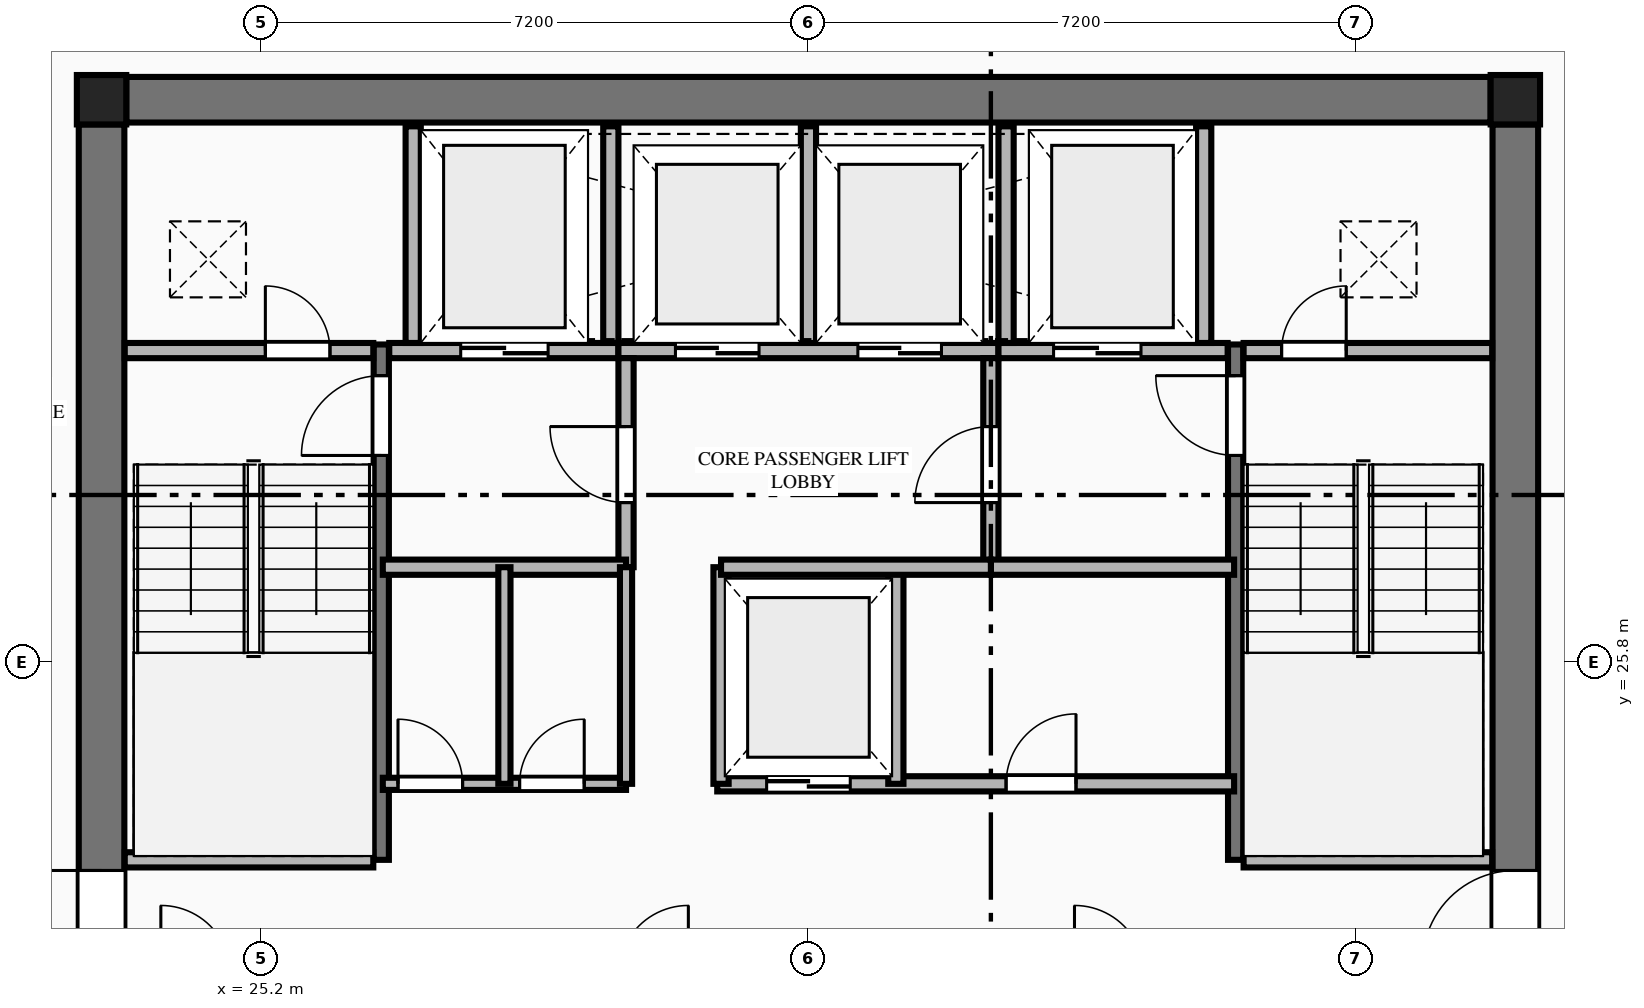
"""IFC4 building model, lengths in metres.
Left out: names, types, materials, properties, quantities, classifications, styles, units other than length and angle.
Written with IfcOpenShell. Run it as: python <this file> out.ifc"""

import sys

from ifc_helpers import new_model, si_unit, direction, frame, frame_2d, origin, origin_2d, place, context, subcontext, project, spatial, rectangle, extrude, element, fill, save


model = new_model("IFC4")
c1 = context("Model", 3, precision=1e-05, world=origin(), true_north=direction((0.0, 1.0)))
c2 = subcontext(c1, "Body", "Model", "MODEL_VIEW")
j1 = project(units=[si_unit("LENGTHUNIT", "METRE"), si_unit("PLANEANGLEUNIT", "RADIAN")], contexts=[c1])
p1 = place(None, origin())
s1 = spatial("IfcSite", under=j1, at=p1, CompositionType="ELEMENT")
p2 = place(p1, origin())
s2 = spatial("IfcBuilding", under=s1, at=p2, CompositionType="ELEMENT")
p3 = place(p2, frame((0.0, 0.0, 207.4)))
s3 = spatial("IfcBuildingStorey", under=s2, at=p3, CompositionType="ELEMENT", Elevation=207.4)
for number, where, z_axis, x_axis in (
    (1, (41.7, 33.2, 0.0), (0.0, 0.0, 1.0), (1.0, 0.0, 0.0)),
    (2, (23.1, 33.2, 0.0), (0.0, 0.0, 1.0), (1.0, 0.0, 0.0)),
):
    element("IfcColumn", number, at=place(p3, frame(where, z_axis=z_axis, x_axis=x_axis)), inside=s3, PredefinedType="COLUMN", context=c2, shape_type="SweptSolid", body=[
        extrude(rectangle(XDim=0.65, YDim=0.65, at=origin_2d()), origin(), (0.0, 0.0, 1.0), 3.55),
    ])
p4 = place(p3, frame((23.425, 33.2, 0.0), z_axis=(0.0, 0.0, 1.0), x_axis=(1.0, 0.0, 0.0)))
e3 = element("IfcWall", 3, at=p4, inside=s3, PredefinedType="SHEAR", context=c2, shape_type="SweptSolid", body=[
    extrude(rectangle(XDim=17.95, YDim=0.6, at=frame_2d((8.975, 0.0))), origin(), (0.0, 0.0, 1.0), 3.35),
])
p5 = place(p3, frame((23.1, 18.925, 0.0), z_axis=(0.0, 0.0, 1.0), x_axis=(0.0, 1.0, 0.0)))
e4 = element("IfcWall", 4, at=p5, inside=s3, PredefinedType="SHEAR", context=c2, shape_type="SweptSolid", body=[
    extrude(rectangle(XDim=13.95, YDim=0.6, at=frame_2d((6.975, 0.0))), origin(), (0.0, 0.0, 1.0), 3.35),
])
p6 = place(p5, frame((2.915, 0.0, 0.0)))
e5 = element("IfcOpeningElement", 5, at=p6, cuts=e4, PredefinedType="OPENING", context=c2, shape_type="SweptSolid", body=[
    extrude(rectangle(XDim=1.22, YDim=2.25, at=frame_2d((0.61, 1.125))), frame((0.0, 0.31, 0.0), z_axis=(0.0, -1.0, 0.0), x_axis=(1.0, 0.0, 0.0)), (0.0, 0.0, 1.0), 0.62),
])
p7 = place(p3, frame((41.7, 18.925, 0.0), z_axis=(0.0, 0.0, 1.0), x_axis=(0.0, 1.0, 0.0)))
e6 = element("IfcWall", 6, at=p7, inside=s3, PredefinedType="SHEAR", context=c2, shape_type="SweptSolid", body=[
    extrude(rectangle(XDim=13.95, YDim=0.6, at=frame_2d((6.975, 0.0))), origin(), (0.0, 0.0, 1.0), 3.35),
])
p8 = place(p7, frame((2.915, 0.0, 0.0)))
e7 = element("IfcOpeningElement", 7, at=p8, cuts=e6, PredefinedType="OPENING", context=c2, shape_type="SweptSolid", body=[
    extrude(rectangle(XDim=1.22, YDim=2.25, at=frame_2d((0.61, 1.125))), frame((0.0, 0.31, 0.0), z_axis=(0.0, -1.0, 0.0), x_axis=(1.0, 0.0, 0.0)), (0.0, 0.0, 1.0), 0.62),
])
p9 = place(p3, frame((26.78, 23.2, 0.0), z_axis=(0.0, 0.0, 1.0), x_axis=(0.0, 1.0, 0.0)))
e8 = element("IfcWall", 8, at=p9, inside=s3, PredefinedType="SHEAR", context=c2, shape_type="SweptSolid", body=[
    extrude(rectangle(XDim=6.78, YDim=0.2, at=frame_2d((3.39, 0.0))), origin(), (0.0, 0.0, 1.0), 3.55),
])
p10 = place(p9, frame((5.32, 0.0, 0.0)))
e9 = element("IfcOpeningElement", 9, at=p10, cuts=e8, PredefinedType="OPENING", context=c2, shape_type="SweptSolid", body=[
    extrude(rectangle(XDim=1.05, YDim=2.15, at=frame_2d((0.525, 1.075))), frame((0.0, 0.11, 0.0), z_axis=(0.0, -1.0, 0.0), x_axis=(1.0, 0.0, 0.0)), (0.0, 0.0, 1.0), 0.22),
])
p11 = place(p3, frame((23.405, 23.2, 0.0), z_axis=(0.0, 0.0, 1.0), x_axis=(1.0, 0.0, 0.0)))
e10 = element("IfcWall", 10, at=p11, inside=s3, PredefinedType="PLUMBINGWALL", context=c2, shape_type="SweptSolid", body=[
    extrude(rectangle(XDim=3.27, YDim=0.2, at=frame_2d((1.635, 0.0))), origin(), (0.0, 0.0, 1.0), 3.35),
])
p12 = place(p3, frame((38.02, 23.2, 0.0), z_axis=(0.0, 0.0, 1.0), x_axis=(0.0, 1.0, 0.0)))
e11 = element("IfcWall", 11, at=p12, inside=s3, PredefinedType="SHEAR", context=c2, shape_type="SweptSolid", body=[
    extrude(rectangle(XDim=6.78, YDim=0.2, at=frame_2d((3.39, 0.0))), origin(), (0.0, 0.0, 1.0), 3.55),
])
p13 = place(p12, frame((5.32, 0.0, 0.0)))
e12 = element("IfcOpeningElement", 12, at=p13, cuts=e11, PredefinedType="OPENING", context=c2, shape_type="SweptSolid", body=[
    extrude(rectangle(XDim=1.05, YDim=2.15, at=frame_2d((0.525, 1.075))), frame((0.0, 0.11, 0.0), z_axis=(0.0, -1.0, 0.0), x_axis=(1.0, 0.0, 0.0)), (0.0, 0.0, 1.0), 0.22),
])
p14 = place(p3, frame((38.125, 23.2, 0.0), z_axis=(0.0, 0.0, 1.0), x_axis=(1.0, 0.0, 0.0)))
e13 = element("IfcWall", 13, at=p14, inside=s3, PredefinedType="PLUMBINGWALL", context=c2, shape_type="SweptSolid", body=[
    extrude(rectangle(XDim=3.27, YDim=0.2, at=frame_2d((1.635, 0.0))), origin(), (0.0, 0.0, 1.0), 3.35),
])
p15 = place(p3, frame((23.405, 29.9, 0.0), z_axis=(0.0, 0.0, 1.0), x_axis=(1.0, 0.0, 0.0)))
e14 = element("IfcWall", 14, at=p15, inside=s3, PredefinedType="PLUMBINGWALL", context=c2, shape_type="SweptSolid", body=[
    extrude(rectangle(XDim=3.27, YDim=0.2, at=frame_2d((1.635, 0.0))), origin(), (0.0, 0.0, 1.0), 3.35),
])
p16 = place(p15, frame((1.85, 0.0, 0.0)))
e15 = element("IfcOpeningElement", 15, at=p16, cuts=e14, PredefinedType="OPENING", context=c2, shape_type="SweptSolid", body=[
    extrude(rectangle(XDim=0.85, YDim=2.05, at=frame_2d((0.425, 1.025))), frame((0.0, 0.11, 0.0), z_axis=(0.0, -1.0, 0.0), x_axis=(1.0, 0.0, 0.0)), (0.0, 0.0, 1.0), 0.22),
])
p17 = place(p3, frame((26.885, 29.9, 0.0), z_axis=(0.0, 0.0, 1.0), x_axis=(1.0, 0.0, 0.0)))
e16 = element("IfcWall", 16, at=p17, inside=s3, PredefinedType="PLUMBINGWALL", context=c2, shape_type="SweptSolid", body=[
    extrude(rectangle(XDim=3.015, YDim=0.2, at=frame_2d((1.507, 0.0))), origin(), (0.0, 0.0, 1.0), 3.35),
])
p18 = place(p17, frame((0.94, 0.0, 0.0)))
e17 = element("IfcOpeningElement", 17, at=p18, cuts=e16, PredefinedType="OPENING", context=c2, shape_type="SweptSolid", body=[
    extrude(rectangle(XDim=1.15, YDim=2.2, at=frame_2d((0.575, 1.1))), frame((0.0, 0.11, 0.0), z_axis=(0.0, -1.0, 0.0), x_axis=(1.0, 0.0, 0.0)), (0.0, 0.0, 1.0), 0.22),
])
p19 = place(p3, frame((29.9, 29.9, 0.0), z_axis=(0.0, 0.0, 1.0), x_axis=(1.0, 0.0, 0.0)))
e18 = element("IfcWall", 18, at=p19, inside=s3, PredefinedType="PLUMBINGWALL", context=c2, shape_type="SweptSolid", body=[
    extrude(rectangle(XDim=5.0, YDim=0.2, at=frame_2d((2.5, 0.0))), origin(), (0.0, 0.0, 1.0), 3.35),
])
p20 = place(p19, frame((0.75, 0.0, 0.0)))
e19 = element("IfcOpeningElement", 19, at=p20, cuts=e18, PredefinedType="OPENING", context=c2, shape_type="SweptSolid", body=[
    extrude(rectangle(XDim=1.1, YDim=2.2, at=frame_2d((0.55, 1.1))), frame((0.0, 0.11, 0.0), z_axis=(0.0, -1.0, 0.0), x_axis=(1.0, 0.0, 0.0)), (0.0, 0.0, 1.0), 0.22),
])
p21 = place(p19, frame((3.15, 0.0, 0.0)))
e20 = element("IfcOpeningElement", 20, at=p21, cuts=e18, PredefinedType="OPENING", context=c2, shape_type="SweptSolid", body=[
    extrude(rectangle(XDim=1.1, YDim=2.2, at=frame_2d((0.55, 1.1))), frame((0.0, 0.11, 0.0), z_axis=(0.0, -1.0, 0.0), x_axis=(1.0, 0.0, 0.0)), (0.0, 0.0, 1.0), 0.22),
])
p22 = place(p3, frame((34.9, 29.9, 0.0), z_axis=(0.0, 0.0, 1.0), x_axis=(1.0, 0.0, 0.0)))
e21 = element("IfcWall", 21, at=p22, inside=s3, PredefinedType="PLUMBINGWALL", context=c2, shape_type="SweptSolid", body=[
    extrude(rectangle(XDim=3.015, YDim=0.2, at=frame_2d((1.508, 0.0))), origin(), (0.0, 0.0, 1.0), 3.35),
])
p23 = place(p22, frame((0.725, 0.0, 0.0)))
e22 = element("IfcOpeningElement", 22, at=p23, cuts=e21, PredefinedType="OPENING", context=c2, shape_type="SweptSolid", body=[
    extrude(rectangle(XDim=1.15, YDim=2.2, at=frame_2d((0.575, 1.1))), frame((0.0, 0.11, 0.0), z_axis=(0.0, -1.0, 0.0), x_axis=(1.0, 0.0, 0.0)), (0.0, 0.0, 1.0), 0.22),
])
p24 = place(p3, frame((38.125, 29.9, 0.0), z_axis=(0.0, 0.0, 1.0), x_axis=(1.0, 0.0, 0.0)))
e23 = element("IfcWall", 23, at=p24, inside=s3, PredefinedType="PLUMBINGWALL", context=c2, shape_type="SweptSolid", body=[
    extrude(rectangle(XDim=3.27, YDim=0.2, at=frame_2d((1.635, 0.0))), origin(), (0.0, 0.0, 1.0), 3.35),
])
p25 = place(p24, frame((0.5, 0.0, 0.0)))
e24 = element("IfcOpeningElement", 24, at=p25, cuts=e23, PredefinedType="OPENING", context=c2, shape_type="SweptSolid", body=[
    extrude(rectangle(XDim=0.85, YDim=2.05, at=frame_2d((0.425, 1.025))), frame((0.0, 0.11, 0.0), z_axis=(0.0, -1.0, 0.0), x_axis=(1.0, 0.0, 0.0)), (0.0, 0.0, 1.0), 0.22),
])
for number, where, z_axis, x_axis in (
    (25, (27.2, 30.0, 0.0), (0.0, 0.0, 1.0), (0.0, 1.0, 0.0)),
    (26, (29.8, 30.0, 0.0), (0.0, 0.0, 1.0), (0.0, 1.0, 0.0)),
    (27, (32.4, 30.0, 0.0), (0.0, 0.0, 1.0), (0.0, 1.0, 0.0)),
    (28, (35.0, 30.0, 0.0), (0.0, 0.0, 1.0), (0.0, 1.0, 0.0)),
    (29, (37.6, 30.0, 0.0), (0.0, 0.0, 1.0), (0.0, 1.0, 0.0)),
):
    element("IfcWall", number, at=place(p3, frame(where, z_axis=z_axis, x_axis=x_axis)), inside=s3, PredefinedType="PLUMBINGWALL", context=c2, shape_type="SweptSolid", body=[
        extrude(rectangle(XDim=2.85, YDim=0.2, at=frame_2d((1.425, 0.0))), origin(), (0.0, 0.0, 1.0), 3.35),
    ])
p26 = place(p3, frame((30.0, 27.05, 0.0), z_axis=(0.0, 0.0, 1.0), x_axis=(0.0, 1.0, 0.0)))
e30 = element("IfcWall", 30, at=p26, inside=s3, PredefinedType="PLUMBINGWALL", context=c2, shape_type="SweptSolid", body=[
    extrude(rectangle(XDim=2.75, YDim=0.2, at=frame_2d((1.375, 0.0))), origin(), (0.0, 0.0, 1.0), 3.35),
])
p27 = place(p26, frame((0.85, 0.0, 0.0)))
e31 = element("IfcOpeningElement", 31, at=p27, cuts=e30, PredefinedType="OPENING", context=c2, shape_type="SweptSolid", body=[
    extrude(rectangle(XDim=1.0, YDim=2.15, at=frame_2d((0.5, 1.075))), frame((0.0, 0.11, 0.0), z_axis=(0.0, -1.0, 0.0), x_axis=(1.0, 0.0, 0.0)), (0.0, 0.0, 1.0), 0.22),
])
p28 = place(p3, frame((26.8, 27.05, 0.0), z_axis=(0.0, 0.0, 1.0), x_axis=(1.0, 0.0, 0.0)))
e32 = element("IfcWall", 32, at=p28, inside=s3, PredefinedType="PLUMBINGWALL", context=c2, shape_type="SweptSolid", body=[
    extrude(rectangle(XDim=3.2, YDim=0.2, at=frame_2d((1.6, 0.0))), origin(), (0.0, 0.0, 1.0), 3.35),
])
p29 = place(p3, frame((34.8, 27.05, 0.0), z_axis=(0.0, 0.0, 1.0), x_axis=(0.0, 1.0, 0.0)))
e33 = element("IfcWall", 33, at=p29, inside=s3, PredefinedType="PLUMBINGWALL", context=c2, shape_type="SweptSolid", body=[
    extrude(rectangle(XDim=2.75, YDim=0.2, at=frame_2d((1.375, 0.0))), origin(), (0.0, 0.0, 1.0), 3.35),
])
p30 = place(p29, frame((0.85, 0.0, 0.0)))
e34 = element("IfcOpeningElement", 34, at=p30, cuts=e33, PredefinedType="OPENING", context=c2, shape_type="SweptSolid", body=[
    extrude(rectangle(XDim=1.0, YDim=2.15, at=frame_2d((0.5, 1.075))), frame((0.0, 0.11, 0.0), z_axis=(0.0, -1.0, 0.0), x_axis=(1.0, 0.0, 0.0)), (0.0, 0.0, 1.0), 0.22),
])
p31 = place(p3, frame((34.8, 27.05, 0.0), z_axis=(0.0, 0.0, 1.0), x_axis=(1.0, 0.0, 0.0)))
e35 = element("IfcWall", 35, at=p31, inside=s3, PredefinedType="PLUMBINGWALL", context=c2, shape_type="SweptSolid", body=[
    extrude(rectangle(XDim=3.2, YDim=0.2, at=frame_2d((1.6, 0.0))), origin(), (0.0, 0.0, 1.0), 3.35),
])
p32 = place(p3, frame((26.8, 24.2, 0.0), z_axis=(0.0, 0.0, 1.0), x_axis=(1.0, 0.0, 0.0)))
e36 = element("IfcWall", 36, at=p32, inside=s3, PredefinedType="PARTITIONING", context=c2, shape_type="SweptSolid", body=[
    extrude(rectangle(XDim=3.2, YDim=0.16, at=frame_2d((1.6, 0.0))), origin(), (0.0, 0.0, 1.0), 3.35),
])
p33 = place(p32, frame((0.2, 0.0, 0.0)))
e37 = element("IfcOpeningElement", 37, at=p33, cuts=e36, PredefinedType="OPENING", context=c2, shape_type="SweptSolid", body=[
    extrude(rectangle(XDim=0.85, YDim=2.05, at=frame_2d((0.425, 1.025))), frame((0.0, 0.09, 0.0), z_axis=(0.0, -1.0, 0.0), x_axis=(1.0, 0.0, 0.0)), (0.0, 0.0, 1.0), 0.18),
])
p34 = place(p32, frame((1.8, 0.0, 0.0)))
e38 = element("IfcOpeningElement", 38, at=p34, cuts=e36, PredefinedType="OPENING", context=c2, shape_type="SweptSolid", body=[
    extrude(rectangle(XDim=0.85, YDim=2.05, at=frame_2d((0.425, 1.025))), frame((0.0, 0.09, 0.0), z_axis=(0.0, -1.0, 0.0), x_axis=(1.0, 0.0, 0.0)), (0.0, 0.0, 1.0), 0.18),
])
p35 = place(p3, frame((30.0, 24.2, 0.0), z_axis=(0.0, 0.0, 1.0), x_axis=(0.0, 1.0, 0.0)))
e39 = element("IfcWall", 39, at=p35, inside=s3, PredefinedType="PARTITIONING", context=c2, shape_type="SweptSolid", body=[
    extrude(rectangle(XDim=2.85, YDim=0.16, at=frame_2d((1.425, 0.0))), origin(), (0.0, 0.0, 1.0), 3.35),
])
p36 = place(p3, frame((31.2, 24.2, 0.0), z_axis=(0.0, 0.0, 1.0), x_axis=(1.0, 0.0, 0.0)))
e40 = element("IfcWall", 40, at=p36, inside=s3, PredefinedType="PLUMBINGWALL", context=c2, shape_type="SweptSolid", body=[
    extrude(rectangle(XDim=6.8, YDim=0.2, at=frame_2d((3.4, 0.0))), origin(), (0.0, 0.0, 1.0), 3.35),
])
p37 = place(p36, frame((0.65, 0.0, 0.0)))
e41 = element("IfcOpeningElement", 41, at=p37, cuts=e40, PredefinedType="OPENING", context=c2, shape_type="SweptSolid", body=[
    extrude(rectangle(XDim=1.1, YDim=2.2, at=frame_2d((0.55, 1.1))), frame((0.0, 0.11, 0.0), z_axis=(0.0, -1.0, 0.0), x_axis=(1.0, 0.0, 0.0)), (0.0, 0.0, 1.0), 0.22),
])
p38 = place(p36, frame((3.8, 0.0, 0.0)))
e42 = element("IfcOpeningElement", 42, at=p38, cuts=e40, PredefinedType="OPENING", context=c2, shape_type="SweptSolid", body=[
    extrude(rectangle(XDim=0.92, YDim=2.15, at=frame_2d((0.46, 1.075))), frame((0.0, 0.11, 0.0), z_axis=(0.0, -1.0, 0.0), x_axis=(1.0, 0.0, 0.0)), (0.0, 0.0, 1.0), 0.22),
])
for number, where, z_axis, x_axis in (
    (43, (31.25, 24.2, 0.0), (0.0, 0.0, 1.0), (0.0, 1.0, 0.0)),
    (44, (33.55, 24.2, 0.0), (0.0, 0.0, 1.0), (0.0, 1.0, 0.0)),
):
    element("IfcWall", number, at=place(p3, frame(where, z_axis=z_axis, x_axis=x_axis)), inside=s3, PredefinedType="PLUMBINGWALL", context=c2, shape_type="SweptSolid", body=[
        extrude(rectangle(XDim=2.85, YDim=0.2, at=frame_2d((1.425, 0.0))), origin(), (0.0, 0.0, 1.0), 3.35),
    ])
p39 = place(p3, frame((31.25, 27.05, 0.0), z_axis=(0.0, 0.0, 1.0), x_axis=(1.0, 0.0, 0.0)))
e45 = element("IfcWall", 45, at=p39, inside=s3, PredefinedType="PLUMBINGWALL", context=c2, shape_type="SweptSolid", body=[
    extrude(rectangle(XDim=3.55, YDim=0.2, at=frame_2d((1.775, 0.0))), origin(), (0.0, 0.0, 1.0), 3.35),
])
p40 = place(p3, frame((28.4, 24.2, 0.0), z_axis=(0.0, 0.0, 1.0), x_axis=(0.0, 1.0, 0.0)))
e46 = element("IfcWall", 46, at=p40, inside=s3, PredefinedType="PARTITIONING", context=c2, shape_type="SweptSolid", body=[
    extrude(rectangle(XDim=2.85, YDim=0.16, at=frame_2d((1.425, 0.0))), origin(), (0.0, 0.0, 1.0), 3.35),
])
p41 = place(p6, origin())
e47 = element("IfcDoor", 47, at=p41, inside=s3, OperationType="SINGLE_SWING_RIGHT", PredefinedType="DOOR", context=c2, shape_type="SweptSolid", body=[
    extrude(rectangle(XDim=1.22, YDim=2.25, at=frame_2d((0.61, 1.125))), frame((0.0, 0.025, 0.0), z_axis=(0.0, -1.0, 0.0), x_axis=(1.0, 0.0, 0.0)), (0.0, 0.0, 1.0), 0.05),
])
fill(e5, e47)
p42 = place(p8, origin())
e48 = element("IfcDoor", 48, at=p42, inside=s3, OperationType="SINGLE_SWING_LEFT", PredefinedType="DOOR", context=c2, shape_type="SweptSolid", body=[
    extrude(rectangle(XDim=1.22, YDim=2.25, at=frame_2d((0.61, 1.125))), frame((0.0, 0.025, 0.0), z_axis=(0.0, -1.0, 0.0), x_axis=(1.0, 0.0, 0.0)), (0.0, 0.0, 1.0), 0.05),
])
fill(e7, e48)
p43 = place(p10, origin())
e49 = element("IfcDoor", 49, at=p43, inside=s3, OperationType="SINGLE_SWING_LEFT", PredefinedType="DOOR", context=c2, shape_type="SweptSolid", body=[
    extrude(rectangle(XDim=1.05, YDim=2.15, at=frame_2d((0.525, 1.075))), frame((0.0, 0.025, 0.0), z_axis=(0.0, -1.0, 0.0), x_axis=(1.0, 0.0, 0.0)), (0.0, 0.0, 1.0), 0.05),
])
fill(e9, e49)
p44 = place(p13, origin())
e50 = element("IfcDoor", 50, at=p44, inside=s3, OperationType="SINGLE_SWING_RIGHT", PredefinedType="DOOR", context=c2, shape_type="SweptSolid", body=[
    extrude(rectangle(XDim=1.05, YDim=2.15, at=frame_2d((0.525, 1.075))), frame((0.0, 0.025, 0.0), z_axis=(0.0, -1.0, 0.0), x_axis=(1.0, 0.0, 0.0)), (0.0, 0.0, 1.0), 0.05),
])
fill(e12, e50)
p45 = place(p16, origin())
e51 = element("IfcDoor", 51, at=p45, inside=s3, OperationType="SINGLE_SWING_LEFT", PredefinedType="DOOR", context=c2, shape_type="SweptSolid", body=[
    extrude(rectangle(XDim=0.85, YDim=2.05, at=frame_2d((0.425, 1.025))), frame((0.0, 0.025, 0.0), z_axis=(0.0, -1.0, 0.0), x_axis=(1.0, 0.0, 0.0)), (0.0, 0.0, 1.0), 0.05),
])
fill(e15, e51)
p46 = place(p25, origin())
e52 = element("IfcDoor", 52, at=p46, inside=s3, OperationType="SINGLE_SWING_RIGHT", PredefinedType="DOOR", context=c2, shape_type="SweptSolid", body=[
    extrude(rectangle(XDim=0.85, YDim=2.05, at=frame_2d((0.425, 1.025))), frame((0.0, 0.025, 0.0), z_axis=(0.0, -1.0, 0.0), x_axis=(1.0, 0.0, 0.0)), (0.0, 0.0, 1.0), 0.05),
])
fill(e24, e52)
p47 = place(p18, origin())
e53 = element("IfcDoor", 53, at=p47, inside=s3, OperationType="DOUBLE_DOOR_SLIDING", PredefinedType="DOOR", context=c2, shape_type="SweptSolid", body=[
    extrude(rectangle(XDim=1.15, YDim=2.2, at=frame_2d((0.575, 1.1))), frame((0.0, 0.025, 0.0), z_axis=(0.0, -1.0, 0.0), x_axis=(1.0, 0.0, 0.0)), (0.0, 0.0, 1.0), 0.05),
])
fill(e17, e53)
p48 = place(p23, origin())
e54 = element("IfcDoor", 54, at=p48, inside=s3, OperationType="DOUBLE_DOOR_SLIDING", PredefinedType="DOOR", context=c2, shape_type="SweptSolid", body=[
    extrude(rectangle(XDim=1.15, YDim=2.2, at=frame_2d((0.575, 1.1))), frame((0.0, 0.025, 0.0), z_axis=(0.0, -1.0, 0.0), x_axis=(1.0, 0.0, 0.0)), (0.0, 0.0, 1.0), 0.05),
])
fill(e22, e54)
p49 = place(p20, origin())
e55 = element("IfcDoor", 55, at=p49, inside=s3, OperationType="DOUBLE_DOOR_SLIDING", PredefinedType="DOOR", context=c2, shape_type="SweptSolid", body=[
    extrude(rectangle(XDim=1.1, YDim=2.2, at=frame_2d((0.55, 1.1))), frame((0.0, 0.025, 0.0), z_axis=(0.0, -1.0, 0.0), x_axis=(1.0, 0.0, 0.0)), (0.0, 0.0, 1.0), 0.05),
])
fill(e19, e55)
p50 = place(p21, origin())
e56 = element("IfcDoor", 56, at=p50, inside=s3, OperationType="DOUBLE_DOOR_SLIDING", PredefinedType="DOOR", context=c2, shape_type="SweptSolid", body=[
    extrude(rectangle(XDim=1.1, YDim=2.2, at=frame_2d((0.55, 1.1))), frame((0.0, 0.025, 0.0), z_axis=(0.0, -1.0, 0.0), x_axis=(1.0, 0.0, 0.0)), (0.0, 0.0, 1.0), 0.05),
])
fill(e20, e56)
p51 = place(p27, origin())
e57 = element("IfcDoor", 57, at=p51, inside=s3, OperationType="SINGLE_SWING_RIGHT", PredefinedType="DOOR", context=c2, shape_type="SweptSolid", body=[
    extrude(rectangle(XDim=1.0, YDim=2.15, at=frame_2d((0.5, 1.075))), frame((0.0, 0.025, 0.0), z_axis=(0.0, -1.0, 0.0), x_axis=(1.0, 0.0, 0.0)), (0.0, 0.0, 1.0), 0.05),
])
fill(e31, e57)
p52 = place(p30, origin())
e58 = element("IfcDoor", 58, at=p52, inside=s3, OperationType="SINGLE_SWING_LEFT", PredefinedType="DOOR", context=c2, shape_type="SweptSolid", body=[
    extrude(rectangle(XDim=1.0, YDim=2.15, at=frame_2d((0.5, 1.075))), frame((0.0, 0.025, 0.0), z_axis=(0.0, -1.0, 0.0), x_axis=(1.0, 0.0, 0.0)), (0.0, 0.0, 1.0), 0.05),
])
fill(e34, e58)
p53 = place(p37, origin())
e59 = element("IfcDoor", 59, at=p53, inside=s3, OperationType="DOUBLE_DOOR_SLIDING", PredefinedType="DOOR", context=c2, shape_type="SweptSolid", body=[
    extrude(rectangle(XDim=1.1, YDim=2.2, at=frame_2d((0.55, 1.1))), frame((0.0, 0.025, 0.0), z_axis=(0.0, -1.0, 0.0), x_axis=(1.0, 0.0, 0.0)), (0.0, 0.0, 1.0), 0.05),
])
fill(e41, e59)
p54 = place(p33, origin())
e60 = element("IfcDoor", 60, at=p54, inside=s3, OperationType="SINGLE_SWING_LEFT", PredefinedType="DOOR", context=c2, shape_type="SweptSolid", body=[
    extrude(rectangle(XDim=0.85, YDim=2.05, at=frame_2d((0.425, 1.025))), frame((0.0, 0.025, 0.0), z_axis=(0.0, -1.0, 0.0), x_axis=(1.0, 0.0, 0.0)), (0.0, 0.0, 1.0), 0.05),
])
fill(e37, e60)
p55 = place(p34, origin())
e61 = element("IfcDoor", 61, at=p55, inside=s3, OperationType="SINGLE_SWING_RIGHT", PredefinedType="DOOR", context=c2, shape_type="SweptSolid", body=[
    extrude(rectangle(XDim=0.85, YDim=2.05, at=frame_2d((0.425, 1.025))), frame((0.0, 0.025, 0.0), z_axis=(0.0, -1.0, 0.0), x_axis=(1.0, 0.0, 0.0)), (0.0, 0.0, 1.0), 0.05),
])
fill(e38, e61)
p56 = place(p38, origin())
e62 = element("IfcDoor", 62, at=p56, inside=s3, OperationType="SINGLE_SWING_RIGHT", PredefinedType="DOOR", context=c2, shape_type="SweptSolid", body=[
    extrude(rectangle(XDim=0.92, YDim=2.15, at=frame_2d((0.46, 1.075))), frame((0.0, 0.025, 0.0), z_axis=(0.0, -1.0, 0.0), x_axis=(1.0, 0.0, 0.0)), (0.0, 0.0, 1.0), 0.05),
])
fill(e42, e62)
save(model, sys.argv[1])
